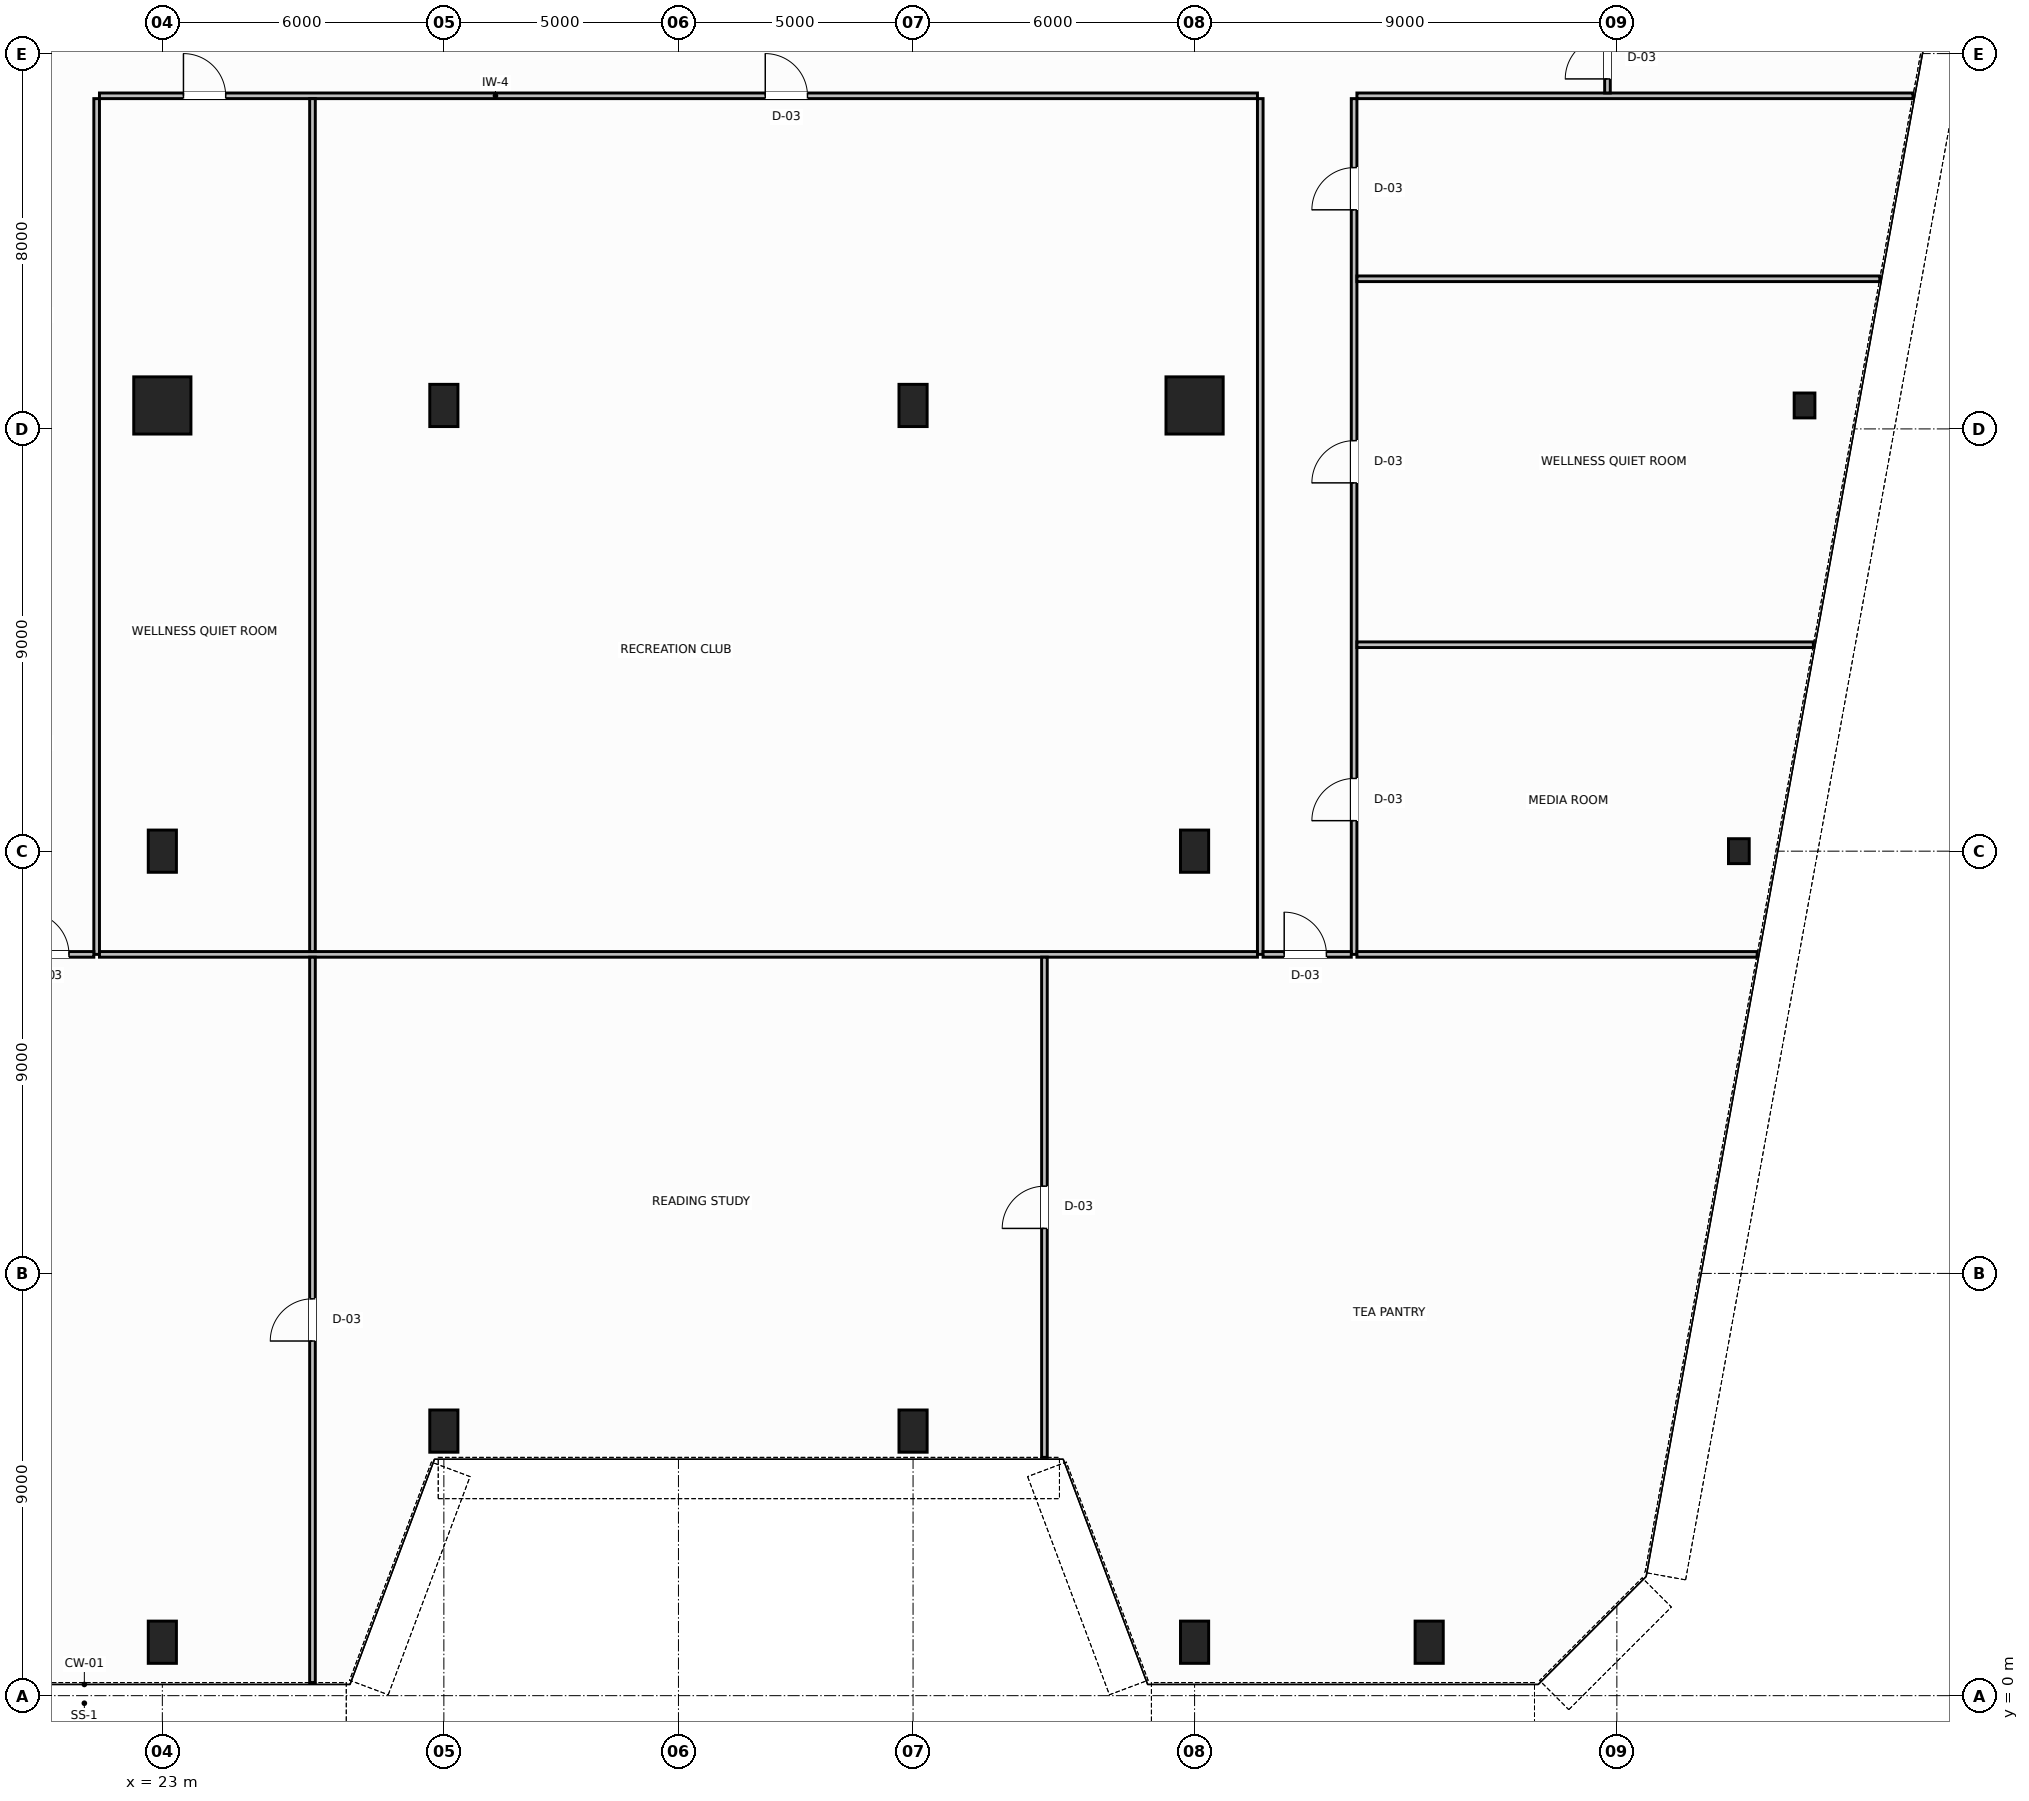
"""IFC4 building model, lengths in metres.
Left out: names, types, materials, properties, quantities, classifications, styles, units other than length and angle.
Written with IfcOpenShell. Run it as: python <this file> out.ifc"""

import sys

from ifc_helpers import new_model, si_unit, direction, frame, frame_2d, origin, origin_2d, place, context, subcontext, project, spatial, rectangle, hollow_rectangle, hollow_circle, i_section, extrude, source, transform, mapped, element, fill, save


model = new_model("IFC4")
c1 = context("Model", 3, precision=1e-05, world=origin(), true_north=direction((0.0, 1.0)))
c2 = subcontext(c1, "Body", "Model", "MODEL_VIEW")
j1 = project(units=[si_unit("LENGTHUNIT", "METRE"), si_unit("PLANEANGLEUNIT", "RADIAN")], contexts=[c1])
p1 = place(None, origin())
s1 = spatial("IfcSite", under=j1, at=p1, CompositionType="ELEMENT")
p2 = place(p1, origin())
s2 = spatial("IfcBuilding", under=s1, at=p2, CompositionType="ELEMENT")
p3 = place(p2, frame((0.0, 0.0, 22.6)))
s3 = spatial("IfcBuildingStorey", under=s2, at=p3, CompositionType="ELEMENT", Elevation=22.6)
m1 = source(origin(), c2, "Body", "SweptSolid", [
    extrude(i_section(OverallWidth=0.442, OverallDepth=0.531, WebThickness=0.065, FlangeThickness=0.076, FilletRadius=0.015, at=origin_2d()), origin(), (0.0, 0.0, 1.0), 3.8),
])
for number, where, z_axis, x_axis in (
    (1, (58.0, 27.5, 0.0), (0.0, 0.0, 1.0), (1.0, 0.0, 0.0)),
    (2, (56.6, 18.0, 0.0), (0.0, 0.0, 1.0), (1.0, 0.0, 0.0)),
):
    element("IfcColumn", number, at=place(p3, frame(where, z_axis=z_axis, x_axis=x_axis)), inside=s3, PredefinedType="COLUMN", context=c2, shape_type="MappedRepresentation", body=[
        mapped(m1, transform((0.0, 0.0, 0.0), scale=1.0)),
    ])
m2 = source(origin(), c2, "Body", "SweptSolid", [
    extrude(hollow_circle(Radius=0.61, WallThickness=0.05, at=origin_2d()), origin(), (0.0, 0.0, 1.0), 3.8),
])
p4 = place(p3, frame((23.0, 27.5, 0.0), z_axis=(0.0, 0.0, 1.0), x_axis=(1.0, 0.0, 0.0)))
e3 = element("IfcColumn", 3, at=p4, inside=s3, PredefinedType="COLUMN", context=c2, shape_type="MappedRepresentation", body=[
    mapped(m2, transform((0.0, 0.0, 0.0), scale=1.0)),
])
m3 = source(origin(), c2, "Body", "SweptSolid", [
    extrude(hollow_rectangle(XDim=0.6, YDim=0.9, WallThickness=0.04, InnerFilletRadius=0.04, OuterFilletRadius=0.08, at=origin_2d()), origin(), (0.0, 0.0, 1.0), 3.8),
])
for number, where, z_axis, x_axis in (
    (4, (29.0, 27.5, 0.0), (0.0, 0.0, 1.0), (1.0, 0.0, 0.0)),
    (5, (39.0, 27.5, 0.0), (0.0, 0.0, 1.0), (1.0, 0.0, 0.0)),
):
    element("IfcColumn", number, at=place(p3, frame(where, z_axis=z_axis, x_axis=x_axis)), inside=s3, PredefinedType="COLUMN", context=c2, shape_type="MappedRepresentation", body=[
        mapped(m3, transform((0.0, 0.0, 0.0), scale=1.0)),
    ])
p5 = place(p3, frame((45.0, 27.5, 0.0), z_axis=(0.0, 0.0, 1.0), x_axis=(1.0, 0.0, 0.0)))
e6 = element("IfcColumn", 6, at=p5, inside=s3, PredefinedType="COLUMN", context=c2, shape_type="MappedRepresentation", body=[
    mapped(m2, transform((0.0, 0.0, 0.0), scale=1.0)),
])
for number, where, z_axis, x_axis in (
    (7, (23.0, 18.0, 0.0), (0.0, 0.0, 1.0), (1.0, 0.0, 0.0)),
    (8, (45.0, 18.0, 0.0), (0.0, 0.0, 1.0), (1.0, 0.0, 0.0)),
):
    element("IfcColumn", number, at=place(p3, frame(where, z_axis=z_axis, x_axis=x_axis)), inside=s3, PredefinedType="COLUMN", context=c2, shape_type="MappedRepresentation", body=[
        mapped(m3, transform((0.0, 0.0, 0.0), scale=1.0)),
    ])
m4 = source(origin(), c2, "Body", "SweptSolid", [
    extrude(hollow_rectangle(XDim=0.6, YDim=0.9, WallThickness=0.04, InnerFilletRadius=0.04, OuterFilletRadius=0.08, at=origin_2d()), origin(), (0.0, 0.0, 1.0), 3.743),
])
for number, where, z_axis, x_axis in (
    (9, (23.0, 1.139, 0.032), (0.0, 0.064, 0.998), (-1.0, 0.0, 0.0)),
    (10, (29.0, 5.639, 0.032), (0.0, 0.064, 0.998), (-1.0, 0.0, 0.0)),
    (11, (39.0, 5.639, 0.032), (0.0, 0.064, 0.998), (-1.0, 0.0, 0.0)),
    (12, (45.0, 1.139, 0.032), (0.0, 0.064, 0.998), (-1.0, 0.0, 0.0)),
    (13, (50.0, 1.139, 0.032), (0.0, 0.064, 0.998), (-1.0, 0.0, 0.0)),
):
    element("IfcColumn", number, at=place(p3, frame(where, z_axis=z_axis, x_axis=x_axis)), inside=s3, PredefinedType="COLUMN", context=c2, shape_type="MappedRepresentation", body=[
        mapped(m4, transform((0.0, 0.0, 0.0), scale=1.0)),
    ])
p6 = place(p3, frame((21.66, 34.1, 0.0), z_axis=(0.0, 0.0, 1.0), x_axis=(1.0, 0.0, 0.0)))
e14 = element("IfcWall", 14, at=p6, inside=s3, PredefinedType="PARTITIONING", context=c2, shape_type="SweptSolid", body=[
    extrude(rectangle(XDim=24.68, YDim=0.12, at=frame_2d((12.34, 0.0))), origin(), (0.0, 0.0, 1.0), 3.58),
])
p7 = place(p6, frame((1.79, 0.0, 0.0)))
e15 = element("IfcOpeningElement", 15, at=p7, cuts=e14, PredefinedType="OPENING", context=c2, shape_type="SweptSolid", body=[
    extrude(rectangle(XDim=0.9, YDim=2.15, at=frame_2d((0.45, 1.075))), frame((0.0, 0.07, 0.0), z_axis=(0.0, -1.0, 0.0), x_axis=(1.0, 0.0, 0.0)), (0.0, 0.0, 1.0), 0.14),
])
p8 = place(p6, frame((14.19, 0.0, 0.0)))
e16 = element("IfcOpeningElement", 16, at=p8, cuts=e14, PredefinedType="OPENING", context=c2, shape_type="SweptSolid", body=[
    extrude(rectangle(XDim=0.9, YDim=2.15, at=frame_2d((0.45, 1.075))), frame((0.0, 0.07, 0.0), z_axis=(0.0, -1.0, 0.0), x_axis=(1.0, 0.0, 0.0)), (0.0, 0.0, 1.0), 0.14),
])
p9 = place(p3, frame((48.46, 34.1, 0.0), z_axis=(0.0, 0.0, 1.0), x_axis=(1.0, 0.0, 0.0)))
e17 = element("IfcWall", 17, at=p9, inside=s3, PredefinedType="PARTITIONING", context=c2, shape_type="SweptSolid", body=[
    extrude(rectangle(XDim=11.851, YDim=0.12, at=frame_2d((5.926, 0.0))), origin(), (0.0, 0.0, 1.0), 3.58),
])
p10 = place(p3, frame((53.8, 34.16, 0.0), z_axis=(0.0, 0.0, 1.0), x_axis=(0.0, 1.0, 0.0)))
e18 = element("IfcWall", 18, at=p10, inside=s3, PredefinedType="PARTITIONING", context=c2, shape_type="SweptSolid", body=[
    extrude(rectangle(XDim=2.28, YDim=0.12, at=frame_2d((1.14, 0.0))), origin(), (0.0, 0.0, 1.0), 3.58),
])
p11 = place(p10, frame((0.3, 0.0, 0.0)))
e19 = element("IfcOpeningElement", 19, at=p11, cuts=e18, PredefinedType="OPENING", context=c2, shape_type="SweptSolid", body=[
    extrude(rectangle(XDim=0.9, YDim=2.15, at=frame_2d((0.45, 1.075))), frame((0.0, 0.07, 0.0), z_axis=(0.0, -1.0, 0.0), x_axis=(1.0, 0.0, 0.0)), (0.0, 0.0, 1.0), 0.14),
])
for number, where, z_axis, x_axis in (
    (20, (21.6, 15.8, 0.0), (0.0, 0.0, 1.0), (0.0, 1.0, 0.0)),
    (21, (46.4, 15.8, 0.0), (0.0, 0.0, 1.0), (0.0, 1.0, 0.0)),
):
    element("IfcWall", number, at=place(p3, frame(where, z_axis=z_axis, x_axis=x_axis)), inside=s3, PredefinedType="PARTITIONING", context=c2, shape_type="SweptSolid", body=[
        extrude(rectangle(XDim=18.24, YDim=0.12, at=frame_2d((9.12, 0.0))), origin(), (0.0, 0.0, 1.0), 3.58),
    ])
p12 = place(p3, frame((48.4, 15.8, 0.0), z_axis=(0.0, 0.0, 1.0), x_axis=(0.0, 1.0, 0.0)))
e22 = element("IfcWall", 22, at=p12, inside=s3, PredefinedType="PARTITIONING", context=c2, shape_type="SweptSolid", body=[
    extrude(rectangle(XDim=18.24, YDim=0.12, at=frame_2d((9.12, 0.0))), origin(), (0.0, 0.0, 1.0), 3.58),
])
p13 = place(p12, frame((2.85, 0.0, 0.0)))
e23 = element("IfcOpeningElement", 23, at=p13, cuts=e22, PredefinedType="OPENING", context=c2, shape_type="SweptSolid", body=[
    extrude(rectangle(XDim=0.9, YDim=2.15, at=frame_2d((0.45, 1.075))), frame((0.0, 0.07, 0.0), z_axis=(0.0, -1.0, 0.0), x_axis=(1.0, 0.0, 0.0)), (0.0, 0.0, 1.0), 0.14),
])
p14 = place(p12, frame((10.05, 0.0, 0.0)))
e24 = element("IfcOpeningElement", 24, at=p14, cuts=e22, PredefinedType="OPENING", context=c2, shape_type="SweptSolid", body=[
    extrude(rectangle(XDim=0.9, YDim=2.15, at=frame_2d((0.45, 1.075))), frame((0.0, 0.07, 0.0), z_axis=(0.0, -1.0, 0.0), x_axis=(1.0, 0.0, 0.0)), (0.0, 0.0, 1.0), 0.14),
])
p15 = place(p12, frame((15.87, 0.0, 0.0)))
e25 = element("IfcOpeningElement", 25, at=p15, cuts=e22, PredefinedType="OPENING", context=c2, shape_type="SweptSolid", body=[
    extrude(rectangle(XDim=0.9, YDim=2.15, at=frame_2d((0.45, 1.075))), frame((0.0, 0.07, 0.0), z_axis=(0.0, -1.0, 0.0), x_axis=(1.0, 0.0, 0.0)), (0.0, 0.0, 1.0), 0.14),
])
p16 = place(p3, frame((19.66, 15.8, 0.0), z_axis=(0.0, 0.0, 1.0), x_axis=(1.0, 0.0, 0.0)))
e26 = element("IfcWall", 26, at=p16, inside=s3, PredefinedType="PARTITIONING", context=c2, shape_type="SweptSolid", body=[
    extrude(rectangle(XDim=1.88, YDim=0.12, at=frame_2d((0.94, 0.0))), origin(), (0.0, 0.0, 1.0), 3.58),
])
p17 = place(p16, frame((0.45, 0.0, 0.0)))
e27 = element("IfcOpeningElement", 27, at=p17, cuts=e26, PredefinedType="OPENING", context=c2, shape_type="SweptSolid", body=[
    extrude(rectangle(XDim=0.9, YDim=2.15, at=frame_2d((0.45, 1.075))), frame((0.0, 0.07, 0.0), z_axis=(0.0, -1.0, 0.0), x_axis=(1.0, 0.0, 0.0)), (0.0, 0.0, 1.0), 0.14),
])
p18 = place(p3, frame((46.46, 15.8, 0.0), z_axis=(0.0, 0.0, 1.0), x_axis=(1.0, 0.0, 0.0)))
e28 = element("IfcWall", 28, at=p18, inside=s3, PredefinedType="PARTITIONING", context=c2, shape_type="SweptSolid", body=[
    extrude(rectangle(XDim=1.88, YDim=0.12, at=frame_2d((0.94, 0.0))), origin(), (0.0, 0.0, 1.0), 3.58),
])
p19 = place(p18, frame((0.45, 0.0, 0.0)))
e29 = element("IfcOpeningElement", 29, at=p19, cuts=e28, PredefinedType="OPENING", context=c2, shape_type="SweptSolid", body=[
    extrude(rectangle(XDim=0.9, YDim=2.15, at=frame_2d((0.45, 1.075))), frame((0.0, 0.07, 0.0), z_axis=(0.0, -1.0, 0.0), x_axis=(1.0, 0.0, 0.0)), (0.0, 0.0, 1.0), 0.14),
])
p20 = place(p3, frame((48.46, 15.8, 0.0), z_axis=(0.0, 0.0, 1.0), x_axis=(1.0, 0.0, 0.0)))
e30 = element("IfcWall", 30, at=p20, inside=s3, PredefinedType="PARTITIONING", context=c2, shape_type="SweptSolid", body=[
    extrude(rectangle(XDim=8.531, YDim=0.12, at=frame_2d((4.265, 0.0))), origin(), (0.0, 0.0, 1.0), 3.58),
])
p21 = place(p3, frame((48.46, 22.4, 0.0), z_axis=(0.0, 0.0, 1.0), x_axis=(1.0, 0.0, 0.0)))
e31 = element("IfcWall", 31, at=p21, inside=s3, PredefinedType="PARTITIONING", context=c2, shape_type="SweptSolid", body=[
    extrude(rectangle(XDim=9.728, YDim=0.12, at=frame_2d((4.864, 0.0))), origin(), (0.0, 0.0, 1.0), 3.58),
])
p22 = place(p3, frame((48.46, 30.2, 0.0), z_axis=(0.0, 0.0, 1.0), x_axis=(1.0, 0.0, 0.0)))
e32 = element("IfcWall", 32, at=p22, inside=s3, PredefinedType="PARTITIONING", context=c2, shape_type="SweptSolid", body=[
    extrude(rectangle(XDim=11.143, YDim=0.12, at=frame_2d((5.572, 0.0))), origin(), (0.0, 0.0, 1.0), 3.58),
])
p23 = place(p3, frame((21.66, 15.8, 0.0), z_axis=(0.0, 0.0, 1.0), x_axis=(1.0, 0.0, 0.0)))
e33 = element("IfcWall", 33, at=p23, inside=s3, PredefinedType="PARTITIONING", context=c2, shape_type="SweptSolid", body=[
    extrude(rectangle(XDim=24.68, YDim=0.12, at=frame_2d((12.34, 0.0))), origin(), (0.0, 0.0, 1.0), 3.58),
])
p24 = place(p3, frame((26.2, 15.86, 0.0), z_axis=(0.0, 0.0, 1.0), x_axis=(0.0, 1.0, 0.0)))
e34 = element("IfcWall", 34, at=p24, inside=s3, PredefinedType="PARTITIONING", context=c2, shape_type="SweptSolid", body=[
    extrude(rectangle(XDim=18.18, YDim=0.12, at=frame_2d((9.09, 0.0))), origin(), (0.0, 0.0, 1.0), 3.58),
])
p25 = place(p3, frame((26.2, 0.279, 0.0), z_axis=(0.0, 0.0, 1.0), x_axis=(0.0, 1.0, 0.0)))
e35 = element("IfcWall", 35, at=p25, inside=s3, PredefinedType="PARTITIONING", context=c2, shape_type="SweptSolid", body=[
    extrude(rectangle(XDim=15.461, YDim=0.12, at=frame_2d((7.73, 0.0))), origin(), (0.0, 0.0, 1.0), 3.58),
])
p26 = place(p25, frame((7.28, 0.0, 0.0)))
e36 = element("IfcOpeningElement", 36, at=p26, cuts=e35, PredefinedType="OPENING", context=c2, shape_type="SweptSolid", body=[
    extrude(rectangle(XDim=0.9, YDim=2.15, at=frame_2d((0.45, 1.075))), frame((0.0, 0.07, 0.0), z_axis=(0.0, -1.0, 0.0), x_axis=(1.0, 0.0, 0.0)), (0.0, 0.0, 1.0), 0.14),
])
p27 = place(p3, frame((41.8, 5.079, 0.0), z_axis=(0.0, 0.0, 1.0), x_axis=(0.0, 1.0, 0.0)))
e37 = element("IfcWall", 37, at=p27, inside=s3, PredefinedType="PARTITIONING", context=c2, shape_type="SweptSolid", body=[
    extrude(rectangle(XDim=10.661, YDim=0.12, at=frame_2d((5.331, 0.0))), origin(), (0.0, 0.0, 1.0), 3.58),
])
p28 = place(p27, frame((4.88, 0.0, 0.0)))
e38 = element("IfcOpeningElement", 38, at=p28, cuts=e37, PredefinedType="OPENING", context=c2, shape_type="SweptSolid", body=[
    extrude(rectangle(XDim=0.9, YDim=2.15, at=frame_2d((0.45, 1.075))), frame((0.0, 0.07, 0.0), z_axis=(0.0, -1.0, 0.0), x_axis=(1.0, 0.0, 0.0)), (0.0, 0.0, 1.0), 0.14),
])
m5 = source(origin(), c2, "Body", "SweptSolid", [
    extrude(rectangle(XDim=0.9, YDim=2.15, at=frame_2d((0.45, 1.075))), frame((0.0, 0.025, 0.0), z_axis=(0.0, -1.0, 0.0), x_axis=(1.0, 0.0, 0.0)), (0.0, 0.0, 1.0), 0.05),
])
p29 = place(p11, origin())
e39 = element("IfcDoor", 39, at=p29, inside=s3, OperationType="SINGLE_SWING_RIGHT", PredefinedType="DOOR", context=c2, shape_type="MappedRepresentation", body=[
    mapped(m5, transform((0.0, 0.0, 0.0), scale=1.0)),
])
fill(e19, e39)
p30 = place(p13, origin())
e40 = element("IfcDoor", 40, at=p30, inside=s3, OperationType="SINGLE_SWING_RIGHT", PredefinedType="DOOR", context=c2, shape_type="MappedRepresentation", body=[
    mapped(m5, transform((0.0, 0.0, 0.0), scale=1.0)),
])
fill(e23, e40)
p31 = place(p14, origin())
e41 = element("IfcDoor", 41, at=p31, inside=s3, OperationType="SINGLE_SWING_LEFT", PredefinedType="DOOR", context=c2, shape_type="MappedRepresentation", body=[
    mapped(m5, transform((0.0, 0.0, 0.0), scale=1.0)),
])
fill(e24, e41)
p32 = place(p15, origin())
e42 = element("IfcDoor", 42, at=p32, inside=s3, OperationType="SINGLE_SWING_RIGHT", PredefinedType="DOOR", context=c2, shape_type="MappedRepresentation", body=[
    mapped(m5, transform((0.0, 0.0, 0.0), scale=1.0)),
])
fill(e25, e42)
p33 = place(p7, origin())
e43 = element("IfcDoor", 43, at=p33, inside=s3, OperationType="SINGLE_SWING_LEFT", PredefinedType="DOOR", context=c2, shape_type="MappedRepresentation", body=[
    mapped(m5, transform((0.0, 0.0, 0.0), scale=1.0)),
])
fill(e15, e43)
p34 = place(p8, origin())
e44 = element("IfcDoor", 44, at=p34, inside=s3, OperationType="SINGLE_SWING_RIGHT", PredefinedType="DOOR", context=c2, shape_type="MappedRepresentation", body=[
    mapped(m5, transform((0.0, 0.0, 0.0), scale=1.0)),
])
fill(e16, e44)
p35 = place(p17, origin())
e45 = element("IfcDoor", 45, at=p35, inside=s3, OperationType="SINGLE_SWING_LEFT", PredefinedType="DOOR", context=c2, shape_type="MappedRepresentation", body=[
    mapped(m5, transform((0.0, 0.0, 0.0), scale=1.0)),
])
fill(e27, e45)
p36 = place(p26, origin())
e46 = element("IfcDoor", 46, at=p36, inside=s3, OperationType="SINGLE_SWING_RIGHT", PredefinedType="DOOR", context=c2, shape_type="MappedRepresentation", body=[
    mapped(m5, transform((0.0, 0.0, 0.0), scale=1.0)),
])
fill(e36, e46)
p37 = place(p28, origin())
e47 = element("IfcDoor", 47, at=p37, inside=s3, OperationType="SINGLE_SWING_LEFT", PredefinedType="DOOR", context=c2, shape_type="MappedRepresentation", body=[
    mapped(m5, transform((0.0, 0.0, 0.0), scale=1.0)),
])
fill(e38, e47)
p38 = place(p19, origin())
e48 = element("IfcDoor", 48, at=p38, inside=s3, OperationType="SINGLE_SWING_RIGHT", PredefinedType="DOOR", context=c2, shape_type="MappedRepresentation", body=[
    mapped(m5, transform((0.0, 0.0, 0.0), scale=1.0)),
])
fill(e29, e48)
save(model, sys.argv[1])
